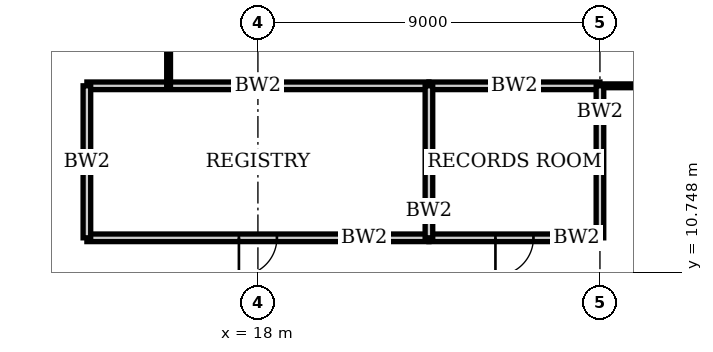
"""IFC4 building model, lengths in metres.
Left out: names, types, materials, properties, quantities, classifications, styles, units other than length and angle.
Written with IfcOpenShell. Run it as: python <this file> out.ifc"""

import sys

from ifc_helpers import new_model, si_unit, direction, frame, frame_2d, origin, place, context, subcontext, project, spatial, rectangle, extrude, element, fill, save


model = new_model("IFC4")
c1 = context("Model", 3, precision=1e-05, world=origin(), true_north=direction((0.0, 1.0)))
c2 = subcontext(c1, "Body", "Model", "MODEL_VIEW")
j1 = project(units=[si_unit("LENGTHUNIT", "METRE"), si_unit("PLANEANGLEUNIT", "RADIAN")], contexts=[c1])
p1 = place(None, origin())
s1 = spatial("IfcSite", under=j1, at=p1, CompositionType="ELEMENT")
p2 = place(p1, origin())
s2 = spatial("IfcBuilding", under=s1, at=p2, CompositionType="ELEMENT")
p3 = place(p2, frame((0.0, 0.0, 35.8)))
s3 = spatial("IfcBuildingStorey", under=s2, at=p3, CompositionType="ELEMENT", Elevation=35.8)
p4 = place(p3, frame((13.5, 11.65, 0.0), z_axis=(0.0, 0.0, 1.0), x_axis=(1.0, 0.0, 0.0)))
e1 = element("IfcWall", 1, at=p4, inside=s3, PredefinedType="SOLIDWALL", context=c2, shape_type="SweptSolid", body=[
    extrude(rectangle(XDim=9.0, YDim=0.2, at=frame_2d((4.5, 0.0))), origin(), (0.0, 0.0, 1.0), 3.75),
])
p5 = place(p4, frame((4.0, 0.0, 0.0)))
e2 = element("IfcOpeningElement", 2, at=p5, cuts=e1, PredefinedType="OPENING", context=c2, shape_type="SweptSolid", body=[
    extrude(rectangle(XDim=1.0, YDim=2.4, at=frame_2d((0.5, 1.2))), frame((0.0, 0.11, 0.0), z_axis=(0.0, -1.0, 0.0), x_axis=(1.0, 0.0, 0.0)), (0.0, 0.0, 1.0), 0.22),
])
p6 = place(p3, frame((22.5, 11.65, 0.0), z_axis=(0.0, 0.0, 1.0), x_axis=(1.0, 0.0, 0.0)))
e3 = element("IfcWall", 3, at=p6, inside=s3, PredefinedType="SOLIDWALL", context=c2, shape_type="SweptSolid", body=[
    extrude(rectangle(XDim=4.5, YDim=0.2, at=frame_2d((2.25, 0.0))), origin(), (0.0, 0.0, 1.0), 3.75),
])
p7 = place(p6, frame((1.75, 0.0, 0.0)))
e4 = element("IfcOpeningElement", 4, at=p7, cuts=e3, PredefinedType="OPENING", context=c2, shape_type="SweptSolid", body=[
    extrude(rectangle(XDim=1.0, YDim=2.4, at=frame_2d((0.5, 1.2))), frame((0.0, 0.11, 0.0), z_axis=(0.0, -1.0, 0.0), x_axis=(1.0, 0.0, 0.0)), (0.0, 0.0, 1.0), 0.22),
])
p8 = place(p3, frame((13.5, 15.65, 0.0), z_axis=(0.0, 0.0, 1.0), x_axis=(1.0, 0.0, 0.0)))
e5 = element("IfcWall", 5, at=p8, inside=s3, PredefinedType="SOLIDWALL", context=c2, shape_type="SweptSolid", body=[
    extrude(rectangle(XDim=9.0, YDim=0.2, at=frame_2d((4.5, 0.0))), origin(), (0.0, 0.0, 1.0), 3.75),
])
p9 = place(p3, frame((22.5, 15.65, 0.0), z_axis=(0.0, 0.0, 1.0), x_axis=(1.0, 0.0, 0.0)))
e6 = element("IfcWall", 6, at=p9, inside=s3, PredefinedType="SOLIDWALL", context=c2, shape_type="SweptSolid", body=[
    extrude(rectangle(XDim=4.5, YDim=0.2, at=frame_2d((2.25, 0.0))), origin(), (0.0, 0.0, 1.0), 3.75),
])
p10 = place(p3, frame((27.0, 15.65, 0.0), z_axis=(0.0, 0.0, 1.0), x_axis=(1.0, 0.0, 0.0)))
e7 = element("IfcWall", 7, at=p10, inside=s3, PredefinedType="PARTITIONING", context=c2, shape_type="SweptSolid", body=[
    extrude(rectangle(XDim=20.35, YDim=0.1, at=frame_2d((10.175, 0.0))), origin(), (0.0, 0.0, 1.0), 3.75),
])
p11 = place(p10, frame((9.675, 0.0, 0.0)))
e8 = element("IfcOpeningElement", 8, at=p11, cuts=e7, PredefinedType="OPENING", context=c2, shape_type="SweptSolid", body=[
    extrude(rectangle(XDim=1.0, YDim=2.4, at=frame_2d((0.5, 1.2))), frame((0.0, 0.06, 0.0), z_axis=(0.0, -1.0, 0.0), x_axis=(1.0, 0.0, 0.0)), (0.0, 0.0, 1.0), 0.12),
])
p12 = place(p3, frame((13.5, 11.65, 0.0), z_axis=(0.0, 0.0, 1.0), x_axis=(0.0, 1.0, 0.0)))
e9 = element("IfcWall", 9, at=p12, inside=s3, PredefinedType="SOLIDWALL", context=c2, shape_type="SweptSolid", body=[
    extrude(rectangle(XDim=4.0, YDim=0.2, at=frame_2d((2.0, 0.0))), origin(), (0.0, 0.0, 1.0), 3.75),
])
p13 = place(p3, frame((15.65, 15.65, 0.0), z_axis=(0.0, 0.0, 1.0), x_axis=(0.0, 1.0, 0.0)))
e10 = element("IfcWall", 10, at=p13, inside=s3, PredefinedType="PARTITIONING", context=c2, shape_type="SweptSolid", body=[
    extrude(rectangle(XDim=22.7, YDim=0.1, at=frame_2d((11.35, 0.0))), origin(), (0.0, 0.0, 1.0), 3.75),
])
p14 = place(p13, frame((10.85, 0.0, 0.0)))
e11 = element("IfcOpeningElement", 11, at=p14, cuts=e10, PredefinedType="OPENING", context=c2, shape_type="SweptSolid", body=[
    extrude(rectangle(XDim=1.0, YDim=2.4, at=frame_2d((0.5, 1.2))), frame((0.0, 0.06, 0.0), z_axis=(0.0, -1.0, 0.0), x_axis=(1.0, 0.0, 0.0)), (0.0, 0.0, 1.0), 0.12),
])
p15 = place(p3, frame((22.5, 11.65, 0.0), z_axis=(0.0, 0.0, 1.0), x_axis=(0.0, 1.0, 0.0)))
e12 = element("IfcWall", 12, at=p15, inside=s3, PredefinedType="SOLIDWALL", context=c2, shape_type="SweptSolid", body=[
    extrude(rectangle(XDim=4.0, YDim=0.2, at=frame_2d((2.0, 0.0))), origin(), (0.0, 0.0, 1.0), 3.75),
])
p16 = place(p3, frame((27.0, 11.65, 0.0), z_axis=(0.0, 0.0, 1.0), x_axis=(0.0, 1.0, 0.0)))
e13 = element("IfcWall", 13, at=p16, inside=s3, PredefinedType="SOLIDWALL", context=c2, shape_type="SweptSolid", body=[
    extrude(rectangle(XDim=4.0, YDim=0.2, at=frame_2d((2.0, 0.0))), origin(), (0.0, 0.0, 1.0), 3.05),
])
p17 = place(p5, origin())
e14 = element("IfcDoor", 14, at=p17, inside=s3, OperationType="SINGLE_SWING_LEFT", PredefinedType="DOOR", context=c2, shape_type="SweptSolid", body=[
    extrude(rectangle(XDim=1.0, YDim=2.4, at=frame_2d((0.5, 1.2))), frame((0.0, 0.035, 0.0), z_axis=(0.0, -1.0, 0.0), x_axis=(1.0, 0.0, 0.0)), (0.0, 0.0, 1.0), 0.07),
])
fill(e2, e14)
p18 = place(p7, origin())
e15 = element("IfcDoor", 15, at=p18, inside=s3, OperationType="SINGLE_SWING_LEFT", PredefinedType="DOOR", context=c2, shape_type="SweptSolid", body=[
    extrude(rectangle(XDim=1.0, YDim=2.4, at=frame_2d((0.5, 1.2))), frame((0.0, 0.035, 0.0), z_axis=(0.0, -1.0, 0.0), x_axis=(1.0, 0.0, 0.0)), (0.0, 0.0, 1.0), 0.07),
])
fill(e4, e15)
save(model, sys.argv[1])
